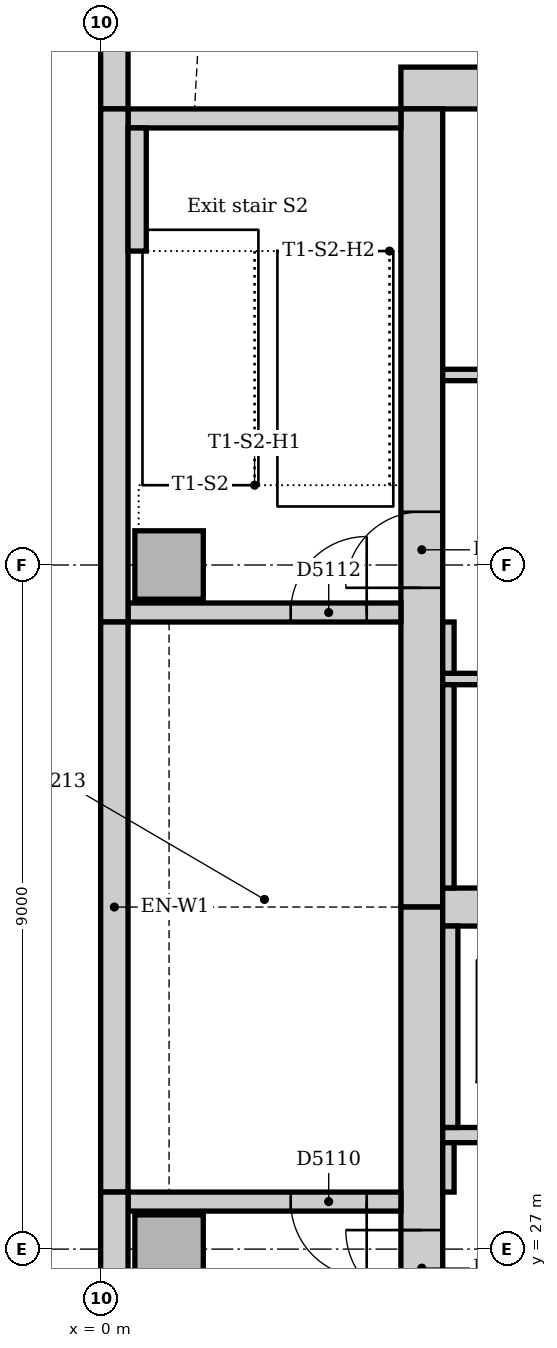
"""IFC4 building model, lengths in metres.
Left out: names, types, materials, properties, quantities, classifications, styles, units other than length and angle.
Written with IfcOpenShell. Run it as: python <this file> out.ifc"""

import sys

from ifc_helpers import new_model, si_unit, direction, frame, frame_2d, origin, origin_2d, place, context, subcontext, project, spatial, rectangle, extrude, element, fill, save


model = new_model("IFC4")
c1 = context("Model", 3, precision=1e-05, world=origin(), true_north=direction((0.0, 1.0)))
c2 = subcontext(c1, "Body", "Model", "MODEL_VIEW")
j1 = project(units=[si_unit("LENGTHUNIT", "METRE"), si_unit("PLANEANGLEUNIT", "RADIAN")], contexts=[c1])
p1 = place(None, origin())
s1 = spatial("IfcSite", under=j1, at=p1, CompositionType="ELEMENT")
p2 = place(p1, origin())
s2 = spatial("IfcBuilding", under=s1, at=p2, CompositionType="ELEMENT")
p3 = place(p2, frame((0.0, 0.0, 218.0)))
s3 = spatial("IfcBuildingStorey", under=s2, at=p3, CompositionType="ELEMENT", Elevation=218.0)
p4 = place(p3, frame((23.05, 42.275, 0.0), z_axis=(0.0, 0.0, 1.0), x_axis=(-1.0, 0.0, 0.0)))
e1 = element("IfcWall", 1, at=p4, inside=s3, PredefinedType="SOLIDWALL", context=c2, shape_type="SweptSolid", body=[
    extrude(rectangle(XDim=19.1, YDim=0.55, at=frame_2d((9.55, 0.0))), origin(), (0.0, 0.0, 1.0), 4.0),
])
p5 = place(p3, frame((4.225, 42.0, 0.0), z_axis=(0.0, 0.0, 1.0), x_axis=(0.0, -1.0, 0.0)))
e2 = element("IfcWall", 2, at=p5, inside=s3, PredefinedType="SOLIDWALL", context=c2, shape_type="SweptSolid", body=[
    extrude(rectangle(XDim=10.5, YDim=0.55, at=frame_2d((5.25, 0.0))), origin(), (0.0, 0.0, 1.0), 4.0),
])
p6 = place(p5, frame((5.3, 0.0, 0.0)))
e3 = element("IfcOpeningElement", 3, at=p6, cuts=e2, PredefinedType="OPENING", context=c2, shape_type="SweptSolid", body=[
    extrude(rectangle(XDim=1.0, YDim=2.1, at=frame_2d((0.5, 1.05))), frame((0.0, 0.285, 0.0), z_axis=(0.0, -1.0, 0.0), x_axis=(1.0, 0.0, 0.0)), (0.0, 0.0, 1.0), 0.57),
])
p7 = place(p3, frame((4.225, 31.5, 0.0), z_axis=(0.0, 0.0, 1.0), x_axis=(0.0, -1.0, 0.0)))
e4 = element("IfcWall", 4, at=p7, inside=s3, PredefinedType="SOLIDWALL", context=c2, shape_type="SweptSolid", body=[
    extrude(rectangle(XDim=10.5, YDim=0.55, at=frame_2d((5.25, 0.0))), origin(), (0.0, 0.0, 1.0), 4.0),
])
p8 = place(p7, frame((4.25, 0.0, 0.0)))
e5 = element("IfcOpeningElement", 5, at=p8, cuts=e4, PredefinedType="OPENING", context=c2, shape_type="SweptSolid", body=[
    extrude(rectangle(XDim=1.0, YDim=2.1, at=frame_2d((0.5, 1.05))), frame((0.0, 0.285, 0.0), z_axis=(0.0, -1.0, 0.0), x_axis=(1.0, 0.0, 0.0)), (0.0, 0.0, 1.0), 0.57),
])
p9 = place(p3, frame((4.5, 31.5, 0.0), z_axis=(0.0, 0.0, 1.0), x_axis=(1.0, 0.0, 0.0)))
e6 = element("IfcWall", 6, at=p9, inside=s3, PredefinedType="SOLIDWALL", context=c2, shape_type="SweptSolid", body=[
    extrude(rectangle(XDim=18.0, YDim=0.5, at=frame_2d((9.0, 0.0))), origin(), (0.0, 0.0, 1.0), 4.0),
])
p10 = place(p3, frame((3.95, 27.625, 0.0), z_axis=(0.0, 0.0, 1.0), x_axis=(-1.0, 0.0, 0.0)))
e7 = element("IfcWall", 7, at=p10, inside=s3, PredefinedType="SOLIDWALL", context=c2, shape_type="SweptSolid", body=[
    extrude(rectangle(XDim=3.59, YDim=0.25, at=frame_2d((1.795, 0.0))), origin(), (0.0, 0.0, 1.0), 4.0),
])
p11 = place(p10, frame((0.45, 0.0, 0.0)))
e8 = element("IfcOpeningElement", 8, at=p11, cuts=e7, PredefinedType="OPENING", context=c2, shape_type="SweptSolid", body=[
    extrude(rectangle(XDim=1.0, YDim=2.1, at=frame_2d((0.5, 1.05))), frame((0.0, 0.135, 0.0), z_axis=(0.0, -1.0, 0.0), x_axis=(1.0, 0.0, 0.0)), (0.0, 0.0, 1.0), 0.27),
])
p12 = place(p3, frame((0.36, 35.375, 0.0), z_axis=(0.0, 0.0, 1.0), x_axis=(1.0, 0.0, 0.0)))
e9 = element("IfcWall", 9, at=p12, inside=s3, PredefinedType="SOLIDWALL", context=c2, shape_type="SweptSolid", body=[
    extrude(rectangle(XDim=3.59, YDim=0.25, at=frame_2d((1.795, 0.0))), origin(), (0.0, 0.0, 1.0), 4.0),
])
p13 = place(p12, frame((2.14, 0.0, 0.0)))
e10 = element("IfcOpeningElement", 10, at=p13, cuts=e9, PredefinedType="OPENING", context=c2, shape_type="SweptSolid", body=[
    extrude(rectangle(XDim=1.0, YDim=2.1, at=frame_2d((0.5, 1.05))), frame((0.0, 0.135, 0.0), z_axis=(0.0, -1.0, 0.0), x_axis=(1.0, 0.0, 0.0)), (0.0, 0.0, 1.0), 0.27),
])
p14 = place(p3, frame((3.95, 41.875, 0.0), z_axis=(0.0, 0.0, 1.0), x_axis=(-1.0, 0.0, 0.0)))
e11 = element("IfcWall", 11, at=p14, inside=s3, PredefinedType="SOLIDWALL", context=c2, shape_type="SweptSolid", body=[
    extrude(rectangle(XDim=3.59, YDim=0.25, at=frame_2d((1.795, 0.0))), origin(), (0.0, 0.0, 1.0), 4.0),
])
for number, where, z_axis, x_axis in (
    (12, (0.9, 27.0, 0.0), (0.0, 0.0, 1.0), (1.0, 0.0, 0.0)),
    (13, (0.9, 36.0, 0.0), (0.0, 0.0, 1.0), (1.0, 0.0, 0.0)),
):
    element("IfcColumn", number, at=place(p3, frame(where, z_axis=z_axis, x_axis=x_axis)), inside=s3, PredefinedType="COLUMN", context=c2, shape_type="SweptSolid", body=[
        extrude(rectangle(XDim=0.9, YDim=0.9, at=origin_2d()), origin(), (0.0, 0.0, 1.0), 4.0),
    ])
p15 = place(p3, frame((0.18, 54.257, 0.0), z_axis=(0.0, 0.0, 1.0), x_axis=(0.0, -1.0, 0.0)))
e14 = element("IfcWall", 14, at=p15, inside=s3, PredefinedType="STANDARD", context=c2, shape_type="SweptSolid", body=[
    extrude(rectangle(XDim=12.257, YDim=0.36, at=frame_2d((6.129, 0.0))), origin(), (0.0, 0.0, 1.0), 3.85),
])
p16 = place(p15, frame((4.207, 0.0, 0.9)))
e15 = element("IfcOpeningElement", 15, at=p16, cuts=e14, PredefinedType="OPENING", context=c2, shape_type="SweptSolid", body=[
    extrude(rectangle(XDim=1.8, YDim=1.6, at=frame_2d((0.9, 0.8))), frame((0.0, 0.19, 0.0), z_axis=(0.0, -1.0, 0.0), x_axis=(1.0, 0.0, 0.0)), (0.0, 0.0, 1.0), 0.38),
])
p17 = place(p15, frame((7.607, 0.0, 0.9)))
e16 = element("IfcOpeningElement", 16, at=p17, cuts=e14, PredefinedType="OPENING", context=c2, shape_type="SweptSolid", body=[
    extrude(rectangle(XDim=3.3, YDim=1.6, at=frame_2d((1.65, 0.8))), frame((0.0, 0.19, 0.0), z_axis=(0.0, -1.0, 0.0), x_axis=(1.0, 0.0, 0.0)), (0.0, 0.0, 1.0), 0.38),
])
p18 = place(p3, frame((0.18, 42.0, 0.0), z_axis=(0.0, 0.0, 1.0), x_axis=(0.0, -1.0, 0.0)))
e17 = element("IfcWall", 17, at=p18, inside=s3, PredefinedType="STANDARD", context=c2, shape_type="SweptSolid", body=[
    extrude(rectangle(XDim=6.75, YDim=0.36, at=frame_2d((3.375, 0.0))), origin(), (0.0, 0.0, 1.0), 3.85),
])
p19 = place(p3, frame((0.18, 35.25, 0.0), z_axis=(0.0, 0.0, 1.0), x_axis=(0.0, -1.0, 0.0)))
e18 = element("IfcWall", 18, at=p19, inside=s3, PredefinedType="STANDARD", context=c2, shape_type="SweptSolid", body=[
    extrude(rectangle(XDim=7.5, YDim=0.36, at=frame_2d((3.75, 0.0))), origin(), (0.0, 0.0, 1.0), 3.85),
])
p20 = place(p3, frame((0.18, 27.75, 0.0), z_axis=(0.0, 0.0, 1.0), x_axis=(0.0, -1.0, 0.0)))
e19 = element("IfcWall", 19, at=p20, inside=s3, PredefinedType="STANDARD", context=c2, shape_type="SweptSolid", body=[
    extrude(rectangle(XDim=6.75, YDim=0.36, at=frame_2d((3.375, 0.0))), origin(), (0.0, 0.0, 1.0), 3.85),
])
p21 = place(p3, frame((0.48, 40.13, 0.0), z_axis=(0.0, 0.0, 1.0), x_axis=(0.0, 1.0, 0.0)))
e20 = element("IfcWall", 20, at=p21, inside=s3, PredefinedType="STANDARD", context=c2, shape_type="SweptSolid", body=[
    extrude(rectangle(XDim=1.62, YDim=0.24, at=frame_2d((0.81, 0.0))), origin(), (0.0, 0.0, 1.0), 4.0),
])
p22 = place(p3, frame((4.5, 28.5, 0.0), z_axis=(0.0, 0.0, 1.0), x_axis=(1.0, 0.0, 0.0)))
e21 = element("IfcWall", 21, at=p22, inside=s3, PredefinedType="PARTITIONING", context=c2, shape_type="SweptSolid", body=[
    extrude(rectangle(XDim=18.0, YDim=0.2, at=frame_2d((9.0, 0.0))), origin(), (0.0, 0.0, 1.0), 3.85),
])
p23 = place(p22, frame((0.95, 0.0, 0.0)))
e22 = element("IfcOpeningElement", 22, at=p23, cuts=e21, PredefinedType="OPENING", context=c2, shape_type="SweptSolid", body=[
    extrude(rectangle(XDim=1.1, YDim=2.1, at=frame_2d((0.55, 1.05))), frame((0.0, 0.11, 0.0), z_axis=(0.0, -1.0, 0.0), x_axis=(1.0, 0.0, 0.0)), (0.0, 0.0, 1.0), 0.22),
])
p24 = place(p22, frame((3.95, 0.0, 0.0)))
e23 = element("IfcOpeningElement", 23, at=p24, cuts=e21, PredefinedType="OPENING", context=c2, shape_type="SweptSolid", body=[
    extrude(rectangle(XDim=1.1, YDim=2.1, at=frame_2d((0.55, 1.05))), frame((0.0, 0.11, 0.0), z_axis=(0.0, -1.0, 0.0), x_axis=(1.0, 0.0, 0.0)), (0.0, 0.0, 1.0), 0.22),
])
p25 = place(p22, frame((6.95, 0.0, 0.0)))
e24 = element("IfcOpeningElement", 24, at=p25, cuts=e21, PredefinedType="OPENING", context=c2, shape_type="SweptSolid", body=[
    extrude(rectangle(XDim=1.1, YDim=2.1, at=frame_2d((0.55, 1.05))), frame((0.0, 0.11, 0.0), z_axis=(0.0, -1.0, 0.0), x_axis=(1.0, 0.0, 0.0)), (0.0, 0.0, 1.0), 0.22),
])
p26 = place(p22, frame((9.95, 0.0, 0.0)))
e25 = element("IfcOpeningElement", 25, at=p26, cuts=e21, PredefinedType="OPENING", context=c2, shape_type="SweptSolid", body=[
    extrude(rectangle(XDim=1.1, YDim=2.1, at=frame_2d((0.55, 1.05))), frame((0.0, 0.11, 0.0), z_axis=(0.0, -1.0, 0.0), x_axis=(1.0, 0.0, 0.0)), (0.0, 0.0, 1.0), 0.22),
])
p27 = place(p22, frame((12.95, 0.0, 0.0)))
e26 = element("IfcOpeningElement", 26, at=p27, cuts=e21, PredefinedType="OPENING", context=c2, shape_type="SweptSolid", body=[
    extrude(rectangle(XDim=1.1, YDim=2.1, at=frame_2d((0.55, 1.05))), frame((0.0, 0.11, 0.0), z_axis=(0.0, -1.0, 0.0), x_axis=(1.0, 0.0, 0.0)), (0.0, 0.0, 1.0), 0.22),
])
p28 = place(p22, frame((15.95, 0.0, 0.0)))
e27 = element("IfcOpeningElement", 27, at=p28, cuts=e21, PredefinedType="OPENING", context=c2, shape_type="SweptSolid", body=[
    extrude(rectangle(XDim=1.1, YDim=2.1, at=frame_2d((0.55, 1.05))), frame((0.0, 0.11, 0.0), z_axis=(0.0, -1.0, 0.0), x_axis=(1.0, 0.0, 0.0)), (0.0, 0.0, 1.0), 0.22),
])
p29 = place(p3, frame((4.6, 28.6, 0.0), z_axis=(0.0, 0.0, 1.0), x_axis=(0.0, 1.0, 0.0)))
e28 = element("IfcWall", 28, at=p29, inside=s3, PredefinedType="PARTITIONING", context=c2, shape_type="SweptSolid", body=[
    extrude(rectangle(XDim=2.65, YDim=0.2, at=frame_2d((1.325, 0.0))), origin(), (0.0, 0.0, 1.0), 3.85),
])
p30 = place(p3, frame((4.5, 38.5, 0.0), z_axis=(0.0, 0.0, 1.0), x_axis=(1.0, 0.0, 0.0)))
e29 = element("IfcWall", 29, at=p30, inside=s3, PredefinedType="PARTITIONING", context=c2, shape_type="SweptSolid", body=[
    extrude(rectangle(XDim=11.9, YDim=0.15, at=frame_2d((5.95, 0.0))), origin(), (0.0, 0.0, 1.0), 3.85),
])
p31 = place(p30, frame((1.1, 0.0, 0.0)))
e30 = element("IfcOpeningElement", 30, at=p31, cuts=e29, PredefinedType="OPENING", context=c2, shape_type="SweptSolid", body=[
    extrude(rectangle(XDim=0.9, YDim=2.1, at=frame_2d((0.45, 1.05))), frame((0.0, 0.085, 0.0), z_axis=(0.0, -1.0, 0.0), x_axis=(1.0, 0.0, 0.0)), (0.0, 0.0, 1.0), 0.17),
])
p32 = place(p30, frame((4.05, 0.0, 0.0)))
e31 = element("IfcOpeningElement", 31, at=p32, cuts=e29, PredefinedType="OPENING", context=c2, shape_type="SweptSolid", body=[
    extrude(rectangle(XDim=0.9, YDim=2.1, at=frame_2d((0.45, 1.05))), frame((0.0, 0.085, 0.0), z_axis=(0.0, -1.0, 0.0), x_axis=(1.0, 0.0, 0.0)), (0.0, 0.0, 1.0), 0.17),
])
p33 = place(p30, frame((7.05, 0.0, 0.0)))
e32 = element("IfcOpeningElement", 32, at=p33, cuts=e29, PredefinedType="OPENING", context=c2, shape_type="SweptSolid", body=[
    extrude(rectangle(XDim=0.9, YDim=2.1, at=frame_2d((0.45, 1.05))), frame((0.0, 0.085, 0.0), z_axis=(0.0, -1.0, 0.0), x_axis=(1.0, 0.0, 0.0)), (0.0, 0.0, 1.0), 0.17),
])
p34 = place(p30, frame((9.95, 0.0, 0.0)))
e33 = element("IfcOpeningElement", 33, at=p34, cuts=e29, PredefinedType="OPENING", context=c2, shape_type="SweptSolid", body=[
    extrude(rectangle(XDim=0.8, YDim=2.1, at=frame_2d((0.4, 1.05))), frame((0.0, 0.085, 0.0), z_axis=(0.0, -1.0, 0.0), x_axis=(1.0, 0.0, 0.0)), (0.0, 0.0, 1.0), 0.17),
])
p35 = place(p3, frame((4.5, 34.5, 0.0), z_axis=(0.0, 0.0, 1.0), x_axis=(1.0, 0.0, 0.0)))
e34 = element("IfcWall", 34, at=p35, inside=s3, PredefinedType="PARTITIONING", context=c2, shape_type="SweptSolid", body=[
    extrude(rectangle(XDim=5.9, YDim=0.15, at=frame_2d((2.95, 0.0))), origin(), (0.0, 0.0, 1.0), 3.85),
])
p36 = place(p35, frame((1.85, 0.0, 0.0)))
e35 = element("IfcOpeningElement", 35, at=p36, cuts=e34, PredefinedType="OPENING", context=c2, shape_type="SweptSolid", body=[
    extrude(rectangle(XDim=0.9, YDim=2.1, at=frame_2d((0.45, 1.05))), frame((0.0, 0.085, 0.0), z_axis=(0.0, -1.0, 0.0), x_axis=(1.0, 0.0, 0.0)), (0.0, 0.0, 1.0), 0.17),
])
p37 = place(p35, frame((4.65, 0.0, 0.0)))
e36 = element("IfcOpeningElement", 36, at=p37, cuts=e34, PredefinedType="OPENING", context=c2, shape_type="SweptSolid", body=[
    extrude(rectangle(XDim=0.9, YDim=2.1, at=frame_2d((0.45, 1.05))), frame((0.0, 0.085, 0.0), z_axis=(0.0, -1.0, 0.0), x_axis=(1.0, 0.0, 0.0)), (0.0, 0.0, 1.0), 0.17),
])
p38 = place(p3, frame((4.575, 34.575, 0.0), z_axis=(0.0, 0.0, 1.0), x_axis=(0.0, 1.0, 0.0)))
e37 = element("IfcWall", 37, at=p38, inside=s3, PredefinedType="PARTITIONING", context=c2, shape_type="SweptSolid", body=[
    extrude(rectangle(XDim=0.675, YDim=0.15, at=frame_2d((0.338, 0.0))), origin(), (0.0, 0.0, 1.0), 3.85),
])
p39 = place(p3, frame((4.575, 31.75, 0.0), z_axis=(0.0, 0.0, 1.0), x_axis=(0.0, 1.0, 0.0)))
e38 = element("IfcWall", 38, at=p39, inside=s3, PredefinedType="PARTITIONING", context=c2, shape_type="SweptSolid", body=[
    extrude(rectangle(XDim=2.675, YDim=0.15, at=frame_2d((1.337, 0.0))), origin(), (0.0, 0.0, 1.0), 3.85),
])
p40 = place(p3, frame((4.575, 27.75, 0.0), z_axis=(0.0, 0.0, 1.0), x_axis=(0.0, 1.0, 0.0)))
e39 = element("IfcWall", 39, at=p40, inside=s3, PredefinedType="PARTITIONING", context=c2, shape_type="SweptSolid", body=[
    extrude(rectangle(XDim=0.65, YDim=0.15, at=frame_2d((0.325, 0.0))), origin(), (0.0, 0.0, 1.0), 3.85),
])
p41 = place(p8, frame((1.0, 0.0, 0.0), z_axis=(0.0, 0.0, 1.0), x_axis=(-1.0, 0.0, 0.0)))
e40 = element("IfcDoor", 40, at=p41, inside=s3, OperationType="SINGLE_SWING_RIGHT", PredefinedType="DOOR", context=c2, shape_type="SweptSolid", body=[
    extrude(rectangle(XDim=1.0, YDim=2.1, at=frame_2d((0.5, 1.05))), frame((0.0, 0.025, 0.0), z_axis=(0.0, -1.0, 0.0), x_axis=(1.0, 0.0, 0.0)), (0.0, 0.0, 1.0), 0.05),
])
fill(e5, e40)
p42 = place(p11, origin())
e41 = element("IfcDoor", 41, at=p42, inside=s3, OperationType="SINGLE_SWING_LEFT", PredefinedType="DOOR", context=c2, shape_type="SweptSolid", body=[
    extrude(rectangle(XDim=1.0, YDim=2.1, at=frame_2d((0.5, 1.05))), frame((0.0, 0.025, 0.0), z_axis=(0.0, -1.0, 0.0), x_axis=(1.0, 0.0, 0.0)), (0.0, 0.0, 1.0), 0.05),
])
fill(e8, e41)
p43 = place(p6, frame((1.0, 0.0, 0.0), z_axis=(0.0, 0.0, 1.0), x_axis=(-1.0, 0.0, 0.0)))
e42 = element("IfcDoor", 42, at=p43, inside=s3, OperationType="SINGLE_SWING_LEFT", PredefinedType="DOOR", context=c2, shape_type="SweptSolid", body=[
    extrude(rectangle(XDim=1.0, YDim=2.1, at=frame_2d((0.5, 1.05))), frame((0.0, 0.025, 0.0), z_axis=(0.0, -1.0, 0.0), x_axis=(1.0, 0.0, 0.0)), (0.0, 0.0, 1.0), 0.05),
])
fill(e3, e42)
p44 = place(p13, origin())
e43 = element("IfcDoor", 43, at=p44, inside=s3, OperationType="SINGLE_SWING_RIGHT", PredefinedType="DOOR", context=c2, shape_type="SweptSolid", body=[
    extrude(rectangle(XDim=1.0, YDim=2.1, at=frame_2d((0.5, 1.05))), frame((0.0, 0.025, 0.0), z_axis=(0.0, -1.0, 0.0), x_axis=(1.0, 0.0, 0.0)), (0.0, 0.0, 1.0), 0.05),
])
fill(e10, e43)
save(model, sys.argv[1])
